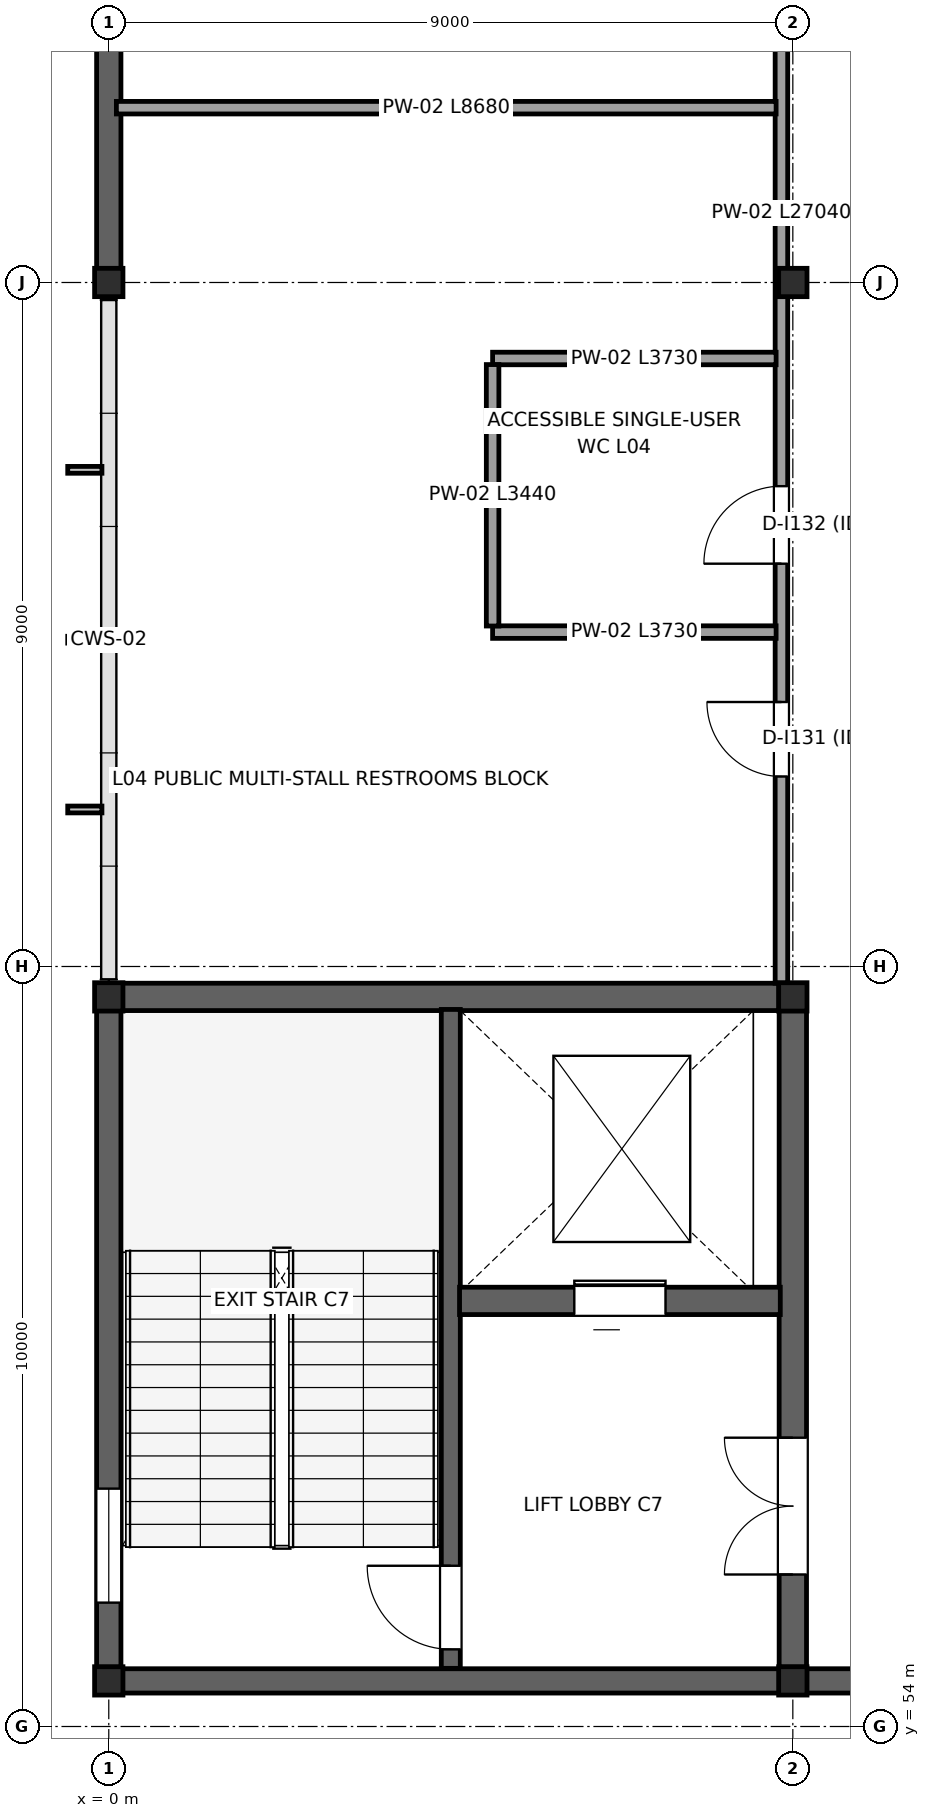
"""IFC4 building model, lengths in metres.
Left out: names, types, materials, properties, quantities, classifications, styles, units other than length and angle.
Written with IfcOpenShell. Run it as: python <this file> out.ifc"""

import sys

from ifc_helpers import new_model, si_unit, direction, frame, frame_2d, origin, origin_2d, place, context, subcontext, project, spatial, rectangle, i_section, extrude, element, fill, save


model = new_model("IFC4")
c1 = context("Model", 3, precision=1e-05, world=origin(), true_north=direction((0.0, 1.0)))
c2 = subcontext(c1, "Body", "Model", "MODEL_VIEW")
j1 = project(units=[si_unit("LENGTHUNIT", "METRE"), si_unit("PLANEANGLEUNIT", "RADIAN")], contexts=[c1])
p1 = place(None, origin())
s1 = spatial("IfcSite", under=j1, at=p1, CompositionType="ELEMENT")
p2 = place(p1, origin())
s2 = spatial("IfcBuilding", under=s1, at=p2, CompositionType="ELEMENT")
p3 = place(p2, frame((0.0, 0.0, 21.0)))
s3 = spatial("IfcBuildingStorey", under=s2, at=p3, CompositionType="ELEMENT", Elevation=21.0)
for number, where, z_axis, x_axis in (
    (1, (0.0, 54.6, 0.0), (0.0, 0.0, 1.0), (1.0, 0.0, 0.0)),
    (2, (0.0, 63.6, 0.0), (0.0, 0.0, 1.0), (1.0, 0.0, 0.0)),
    (3, (0.0, 73.0, 0.0), (0.0, 0.0, 1.0), (1.0, 0.0, 0.0)),
    (4, (9.0, 54.6, 0.0), (0.0, 0.0, 1.0), (1.0, 0.0, 0.0)),
    (5, (9.0, 63.6, 0.0), (0.0, 0.0, 1.0), (1.0, 0.0, 0.0)),
    (6, (9.0, 73.0, 0.0), (0.0, 0.0, 1.0), (1.0, 0.0, 0.0)),
):
    element("IfcColumn", number, at=place(p3, frame(where, z_axis=z_axis, x_axis=x_axis)), inside=s3, PredefinedType="COLUMN", context=c2, shape_type="SweptSolid", body=[
        extrude(i_section(OverallWidth=0.373, OverallDepth=0.373, WebThickness=0.016, FlangeThickness=0.026, at=origin_2d()), origin(), (0.0, 0.0, 1.0), 4.5),
    ])
p4 = place(p3, frame((0.0, 54.78, 0.0), z_axis=(0.0, 0.0, 1.0), x_axis=(0.0, 1.0, 0.0)))
e7 = element("IfcWall", 7, at=p4, inside=s3, PredefinedType="STANDARD", context=c2, shape_type="SweptSolid", body=[
    extrude(rectangle(XDim=8.64, YDim=0.32, at=frame_2d((4.32, 0.0))), origin(), (0.0, 0.0, 1.0), 4.29),
])
p5 = place(p4, frame((0.85, 0.0, 1.1)))
e8 = element("IfcOpeningElement", 8, at=p5, cuts=e7, PredefinedType="OPENING", context=c2, shape_type="SweptSolid", body=[
    extrude(rectangle(XDim=1.5, YDim=1.8, at=frame_2d((0.75, 0.9))), frame((0.0, 0.17, 0.0), z_axis=(0.0, -1.0, 0.0), x_axis=(1.0, 0.0, 0.0)), (0.0, 0.0, 1.0), 0.34),
])
p6 = place(p3, frame((0.0, 73.18, 0.0), z_axis=(0.0, 0.0, 1.0), x_axis=(0.0, 1.0, 0.0)))
e9 = element("IfcWall", 9, at=p6, inside=s3, PredefinedType="STANDARD", context=c2, shape_type="SweptSolid", body=[
    extrude(rectangle(XDim=8.64, YDim=0.32, at=frame_2d((4.32, 0.0))), origin(), (0.0, 0.0, 1.0), 4.29),
])
p7 = place(p6, frame((3.17, 0.0, 1.0)))
e10 = element("IfcOpeningElement", 10, at=p7, cuts=e9, PredefinedType="OPENING", context=c2, shape_type="SweptSolid", body=[
    extrude(rectangle(XDim=2.3, YDim=2.15, at=frame_2d((1.15, 1.075))), frame((0.0, 0.17, 0.0), z_axis=(0.0, -1.0, 0.0), x_axis=(1.0, 0.0, 0.0)), (0.0, 0.0, 1.0), 0.34),
])
for number, where, z_axis, x_axis in (
    (11, (8.985, 54.6, 0.0), (0.0, 0.0, 1.0), (-1.0, 0.0, 0.0)),
    (12, (17.985, 54.6, 0.0), (0.0, 0.0, 1.0), (-1.0, 0.0, 0.0)),
):
    element("IfcWall", number, at=place(p3, frame(where, z_axis=z_axis, x_axis=x_axis)), inside=s3, PredefinedType="STANDARD", context=c2, shape_type="SweptSolid", body=[
        extrude(rectangle(XDim=8.97, YDim=0.32, at=frame_2d((4.485, 0.0))), origin(), (0.0, 0.0, 1.0), 4.29),
    ])
p8 = place(p3, frame((9.0, 54.781, 0.0), z_axis=(0.0, 0.0, 1.0), x_axis=(0.0, 1.0, 0.0)))
e13 = element("IfcWall", 13, at=p8, inside=s3, PredefinedType="SHEAR", context=c2, shape_type="SweptSolid", body=[
    extrude(rectangle(XDim=8.638, YDim=0.36, at=frame_2d((4.319, 0.0))), origin(), (0.0, 0.0, 1.0), 4.29),
])
p9 = place(p8, frame((1.219, 0.0, 0.0)))
e14 = element("IfcOpeningElement", 14, at=p9, cuts=e13, PredefinedType="OPENING", context=c2, shape_type="SweptSolid", body=[
    extrude(rectangle(XDim=1.8, YDim=2.3, at=frame_2d((0.9, 1.15))), frame((0.0, 0.19, 0.0), z_axis=(0.0, -1.0, 0.0), x_axis=(1.0, 0.0, 0.0)), (0.0, 0.0, 1.0), 0.38),
])
p10 = place(p3, frame((0.181, 63.6, 0.0), z_axis=(0.0, 0.0, 1.0), x_axis=(1.0, 0.0, 0.0)))
e15 = element("IfcWall", 15, at=p10, inside=s3, PredefinedType="SHEAR", context=c2, shape_type="SweptSolid", body=[
    extrude(rectangle(XDim=8.638, YDim=0.36, at=frame_2d((4.319, 0.0))), origin(), (0.0, 0.0, 1.0), 4.29),
])
p11 = place(p3, frame((4.5, 54.765, 0.0), z_axis=(0.0, 0.0, 1.0), x_axis=(0.0, 1.0, 0.0)))
e16 = element("IfcWall", 16, at=p11, inside=s3, PredefinedType="SHEAR", context=c2, shape_type="SweptSolid", body=[
    extrude(rectangle(XDim=8.67, YDim=0.25, at=frame_2d((4.335, 0.0))), origin(), (0.0, 0.0, 1.0), 4.29),
])
p12 = place(p11, frame((0.25, 0.0, 0.0)))
e17 = element("IfcOpeningElement", 17, at=p12, cuts=e16, PredefinedType="OPENING", context=c2, shape_type="SweptSolid", body=[
    extrude(rectangle(XDim=1.1, YDim=2.2, at=frame_2d((0.55, 1.1))), frame((0.0, 0.135, 0.0), z_axis=(0.0, -1.0, 0.0), x_axis=(1.0, 0.0, 0.0)), (0.0, 0.0, 1.0), 0.27),
])
p13 = place(p3, frame((4.615, 59.6, 0.0), z_axis=(0.0, 0.0, 1.0), x_axis=(1.0, 0.0, 0.0)))
e18 = element("IfcWall", 18, at=p13, inside=s3, PredefinedType="SHEAR", context=c2, shape_type="SweptSolid", body=[
    extrude(rectangle(XDim=4.22, YDim=0.36, at=frame_2d((2.11, 0.0))), origin(), (0.0, 0.0, 1.0), 4.29),
])
p14 = place(p13, frame((1.51, 0.0, 0.0)))
e19 = element("IfcOpeningElement", 19, at=p14, cuts=e18, PredefinedType="OPENING", context=c2, shape_type="SweptSolid", body=[
    extrude(rectangle(XDim=1.2, YDim=2.3, at=frame_2d((0.6, 1.15))), frame((0.0, 0.19, 0.0), z_axis=(0.0, -1.0, 0.0), x_axis=(1.0, 0.0, 0.0)), (0.0, 0.0, 1.0), 0.38),
])
p15 = place(p3, frame((8.85, 63.78, 0.0), z_axis=(0.0, 0.0, 1.0), x_axis=(0.0, 1.0, 0.0)))
e20 = element("IfcWall", 20, at=p15, inside=s3, PredefinedType="PARTITIONING", context=c2, shape_type="SweptSolid", body=[
    extrude(rectangle(XDim=27.04, YDim=0.165, at=frame_2d((13.52, 0.0))), origin(), (0.0, 0.0, 1.0), 3.5),
])
p16 = place(p15, frame((2.72, 0.0, 0.0)))
e21 = element("IfcOpeningElement", 21, at=p16, cuts=e20, PredefinedType="OPENING", context=c2, shape_type="SweptSolid", body=[
    extrude(rectangle(XDim=0.98, YDim=2.15, at=frame_2d((0.49, 1.075))), frame((0.0, 0.093, 0.0), z_axis=(0.0, -1.0, 0.0), x_axis=(1.0, 0.0, 0.0)), (0.0, 0.0, 1.0), 0.185),
])
p17 = place(p15, frame((5.52, 0.0, 0.0)))
e22 = element("IfcOpeningElement", 22, at=p17, cuts=e20, PredefinedType="OPENING", context=c2, shape_type="SweptSolid", body=[
    extrude(rectangle(XDim=1.02, YDim=2.16, at=frame_2d((0.51, 1.08))), frame((0.0, 0.093, 0.0), z_axis=(0.0, -1.0, 0.0), x_axis=(1.0, 0.0, 0.0)), (0.0, 0.0, 1.0), 0.185),
])
p18 = place(p15, frame((13.72, 0.0, 0.0)))
e23 = element("IfcOpeningElement", 23, at=p18, cuts=e20, PredefinedType="OPENING", context=c2, shape_type="SweptSolid", body=[
    extrude(rectangle(XDim=0.95, YDim=2.12, at=frame_2d((0.475, 1.06))), frame((0.0, 0.093, 0.0), z_axis=(0.0, -1.0, 0.0), x_axis=(1.0, 0.0, 0.0)), (0.0, 0.0, 1.0), 0.185),
])
p19 = place(p15, frame((21.72, 0.0, 0.0)))
e24 = element("IfcOpeningElement", 24, at=p19, cuts=e20, PredefinedType="OPENING", context=c2, shape_type="SweptSolid", body=[
    extrude(rectangle(XDim=0.92, YDim=2.1, at=frame_2d((0.46, 1.05))), frame((0.0, 0.093, 0.0), z_axis=(0.0, -1.0, 0.0), x_axis=(1.0, 0.0, 0.0)), (0.0, 0.0, 1.0), 0.185),
])
for number, where, z_axis, x_axis in (
    (25, (5.05, 68.4, 0.0), (0.0, 0.0, 1.0), (1.0, 0.0, 0.0)),
    (26, (5.05, 72.0, 0.0), (0.0, 0.0, 1.0), (1.0, 0.0, 0.0)),
):
    element("IfcWall", number, at=place(p3, frame(where, z_axis=z_axis, x_axis=x_axis)), inside=s3, PredefinedType="PARTITIONING", context=c2, shape_type="SweptSolid", body=[
        extrude(rectangle(XDim=3.73, YDim=0.165, at=frame_2d((1.865, 0.0))), origin(), (0.0, 0.0, 1.0), 3.5),
    ])
p20 = place(p3, frame((5.05, 68.48, 0.0), z_axis=(0.0, 0.0, 1.0), x_axis=(0.0, 1.0, 0.0)))
e27 = element("IfcWall", 27, at=p20, inside=s3, PredefinedType="PARTITIONING", context=c2, shape_type="SweptSolid", body=[
    extrude(rectangle(XDim=3.44, YDim=0.165, at=frame_2d((1.72, 0.0))), origin(), (0.0, 0.0, 1.0), 3.5),
])
p21 = place(p3, frame((0.1, 75.3, 0.0), z_axis=(0.0, 0.0, 1.0), x_axis=(1.0, 0.0, 0.0)))
e28 = element("IfcWall", 28, at=p21, inside=s3, PredefinedType="PARTITIONING", context=c2, shape_type="SweptSolid", body=[
    extrude(rectangle(XDim=8.68, YDim=0.165, at=frame_2d((4.34, 0.0))), origin(), (0.0, 0.0, 1.0), 3.5),
])
p22 = place(p5, origin())
e29 = element("IfcWindow", 29, at=p22, inside=s3, PartitioningType="SINGLE_PANEL", PredefinedType="WINDOW", context=c2, shape_type="SweptSolid", body=[
    extrude(rectangle(XDim=1.5, YDim=1.8, at=frame_2d((0.75, 0.9))), frame((0.0, 0.03, 0.0), z_axis=(0.0, -1.0, 0.0), x_axis=(1.0, 0.0, 0.0)), (0.0, 0.0, 1.0), 0.06),
])
fill(e8, e29)
p23 = place(p12, origin())
e30 = element("IfcDoor", 30, at=p23, inside=s3, OperationType="SINGLE_SWING_RIGHT", PredefinedType="DOOR", context=c2, shape_type="SweptSolid", body=[
    extrude(rectangle(XDim=1.1, YDim=2.2, at=frame_2d((0.55, 1.1))), frame((0.0, 0.025, 0.0), z_axis=(0.0, -1.0, 0.0), x_axis=(1.0, 0.0, 0.0)), (0.0, 0.0, 1.0), 0.05),
])
fill(e17, e30)
p24 = place(p14, origin())
e31 = element("IfcDoor", 31, at=p24, inside=s3, OperationType="SLIDING_TO_LEFT", PredefinedType="DOOR", context=c2, shape_type="SweptSolid", body=[
    extrude(rectangle(XDim=1.2, YDim=2.3, at=frame_2d((0.6, 1.15))), frame((0.0, 0.025, 0.0), z_axis=(0.0, -1.0, 0.0), x_axis=(1.0, 0.0, 0.0)), (0.0, 0.0, 1.0), 0.05),
])
fill(e19, e31)
p25 = place(p9, origin())
e32 = element("IfcDoor", 32, at=p25, inside=s3, OperationType="DOUBLE_DOOR_SINGLE_SWING", PredefinedType="DOOR", context=c2, shape_type="SweptSolid", body=[
    extrude(rectangle(XDim=1.8, YDim=2.3, at=frame_2d((0.9, 1.15))), frame((0.0, 0.025, 0.0), z_axis=(0.0, -1.0, 0.0), x_axis=(1.0, 0.0, 0.0)), (0.0, 0.0, 1.0), 0.05),
])
fill(e14, e32)
p26 = place(p16, origin())
e33 = element("IfcDoor", 33, at=p26, inside=s3, OperationType="SINGLE_SWING_RIGHT", PredefinedType="DOOR", context=c2, shape_type="SweptSolid", body=[
    extrude(rectangle(XDim=0.98, YDim=2.15, at=frame_2d((0.49, 1.075))), frame((0.0, 0.025, 0.0), z_axis=(0.0, -1.0, 0.0), x_axis=(1.0, 0.0, 0.0)), (0.0, 0.0, 1.0), 0.05),
])
fill(e21, e33)
p27 = place(p17, origin())
e34 = element("IfcDoor", 34, at=p27, inside=s3, OperationType="SINGLE_SWING_LEFT", PredefinedType="DOOR", context=c2, shape_type="SweptSolid", body=[
    extrude(rectangle(XDim=1.02, YDim=2.16, at=frame_2d((0.51, 1.08))), frame((0.0, 0.025, 0.0), z_axis=(0.0, -1.0, 0.0), x_axis=(1.0, 0.0, 0.0)), (0.0, 0.0, 1.0), 0.05),
])
fill(e22, e34)
save(model, sys.argv[1])
